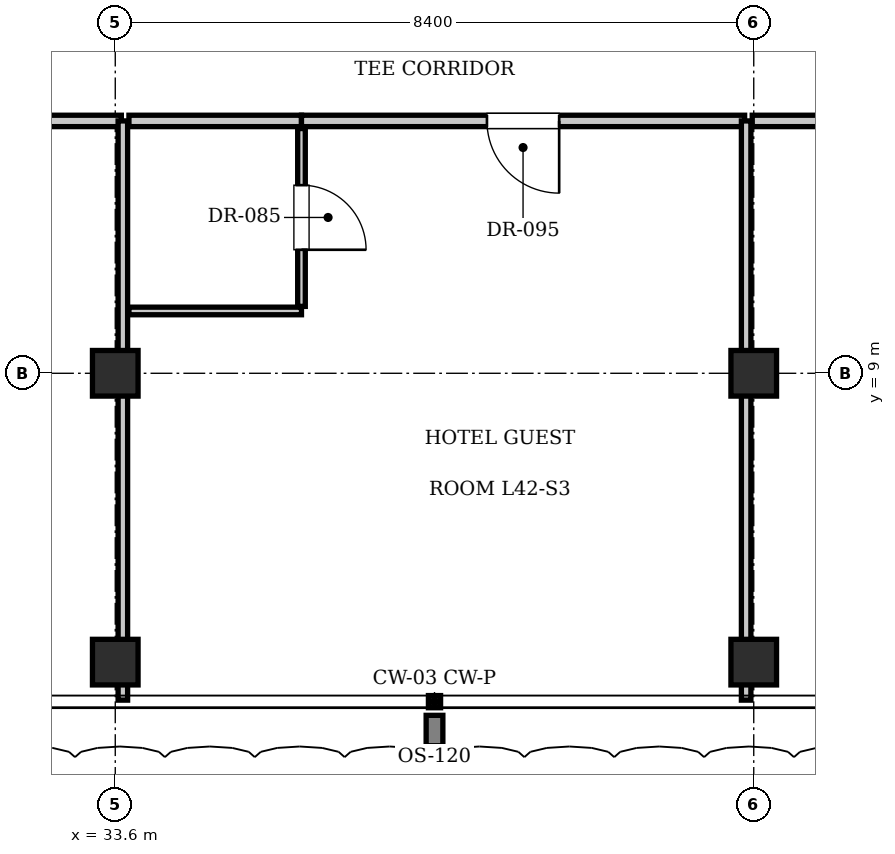
"""IFC4 building model, lengths in metres.
Left out: names, types, materials, properties, quantities, classifications, styles, units other than length and angle.
Written with IfcOpenShell. Run it as: python <this file> out.ifc"""

import sys

from ifc_helpers import new_model, si_unit, direction, frame, frame_2d, origin, origin_2d, place, context, subcontext, project, spatial, rectangle, i_section, extrude, element, fill, save


model = new_model("IFC4")
c1 = context("Model", 3, precision=1e-05, world=origin(), true_north=direction((0.0, 1.0)))
c2 = subcontext(c1, "Body", "Model", "MODEL_VIEW")
j1 = project(units=[si_unit("LENGTHUNIT", "METRE"), si_unit("PLANEANGLEUNIT", "RADIAN")], contexts=[c1])
p1 = place(None, origin())
s1 = spatial("IfcSite", under=j1, at=p1, CompositionType="ELEMENT")
p2 = place(p1, origin())
s2 = spatial("IfcBuilding", under=s1, at=p2, CompositionType="ELEMENT")
p3 = place(p2, frame((0.0, 0.0, 173.6)))
s3 = spatial("IfcBuildingStorey", under=s2, at=p3, CompositionType="ELEMENT", Elevation=173.6)
for number, where, z_axis, x_axis in (
    (1, (33.6, 9.0, 0.0), (0.0, 0.0, 1.0), (1.0, 0.0, 0.0)),
    (2, (42.0, 9.0, 0.0), (0.0, 0.0, 1.0), (1.0, 0.0, 0.0)),
    (3, (33.6, 5.2, 0.0), (0.0, 0.0, 1.0), (1.0, 0.0, 0.0)),
    (4, (42.0, 5.2, 0.0), (0.0, 0.0, 1.0), (1.0, 0.0, 0.0)),
):
    element("IfcColumn", number, at=place(p3, frame(where, z_axis=z_axis, x_axis=x_axis)), inside=s3, PredefinedType="COLUMN", context=c2, shape_type="SweptSolid", body=[
        extrude(i_section(OverallWidth=0.6, OverallDepth=0.6, WebThickness=0.025, FlangeThickness=0.038, at=origin_2d()), origin(), (0.0, 0.0, 1.0), 3.85),
    ])
p4 = place(p3, frame((27.95, 12.32, 0.0), z_axis=(0.0, 0.0, 1.0), x_axis=(1.0, 0.0, 0.0)))
e5 = element("IfcWall", 5, at=p4, inside=s3, PredefinedType="PARTITIONING", context=c2, shape_type="SweptSolid", body=[
    extrude(rectangle(XDim=5.73, YDim=0.15, at=frame_2d((2.865, 0.0))), origin(), (0.0, 0.0, 1.0), 3.61),
])
p5 = place(p4, frame((2.39, 0.0, 0.0)))
e6 = element("IfcOpeningElement", 6, at=p5, cuts=e5, PredefinedType="OPENING", context=c2, shape_type="SweptSolid", body=[
    extrude(rectangle(XDim=0.95, YDim=2.15, at=frame_2d((0.475, 1.075))), frame((0.0, 0.085, 0.0), z_axis=(0.0, -1.0, 0.0), x_axis=(1.0, 0.0, 0.0)), (0.0, 0.0, 1.0), 0.17),
])
p6 = place(p3, frame((33.7, 4.7, 0.0), z_axis=(0.0, 0.0, 1.0), x_axis=(0.0, 1.0, 0.0)))
e7 = element("IfcWall", 7, at=p6, inside=s3, PredefinedType="PARTITIONING", context=c2, shape_type="SweptSolid", body=[
    extrude(rectangle(XDim=7.62, YDim=0.125, at=frame_2d((3.81, 0.0))), origin(), (0.0, 0.0, 1.0), 3.007),
])
p7 = place(p3, frame((33.78, 12.32, 0.0), z_axis=(0.0, 0.0, 1.0), x_axis=(1.0, 0.0, 0.0)))
e8 = element("IfcWall", 8, at=p7, inside=s3, PredefinedType="PARTITIONING", context=c2, shape_type="SweptSolid", body=[
    extrude(rectangle(XDim=2.27, YDim=0.15, at=frame_2d((1.135, 0.0))), origin(), (0.0, 0.0, 1.0), 3.61),
])
p8 = place(p3, frame((33.78, 9.82, 0.0), z_axis=(0.0, 0.0, 1.0), x_axis=(1.0, 0.0, 0.0)))
e9 = element("IfcWall", 9, at=p8, inside=s3, PredefinedType="PARTITIONING", context=c2, shape_type="SweptSolid", body=[
    extrude(rectangle(XDim=2.27, YDim=0.1, at=frame_2d((1.135, 0.0))), origin(), (0.0, 0.0, 1.0), 3.61),
])
p9 = place(p3, frame((36.05, 9.88, 0.0), z_axis=(0.0, 0.0, 1.0), x_axis=(0.0, 1.0, 0.0)))
e10 = element("IfcWall", 10, at=p9, inside=s3, PredefinedType="PARTITIONING", context=c2, shape_type="SweptSolid", body=[
    extrude(rectangle(XDim=2.34, YDim=0.1, at=frame_2d((1.17, 0.0))), origin(), (0.0, 0.0, 1.0), 3.61),
])
p10 = place(p9, frame((0.745, 0.0, 0.0)))
e11 = element("IfcOpeningElement", 11, at=p10, cuts=e10, PredefinedType="OPENING", context=c2, shape_type="SweptSolid", body=[
    extrude(rectangle(XDim=0.85, YDim=2.1, at=frame_2d((0.425, 1.05))), frame((0.0, 0.06, 0.0), z_axis=(0.0, -1.0, 0.0), x_axis=(1.0, 0.0, 0.0)), (0.0, 0.0, 1.0), 0.12),
])
p11 = place(p3, frame((36.05, 12.32, 0.0), z_axis=(0.0, 0.0, 1.0), x_axis=(1.0, 0.0, 0.0)))
e12 = element("IfcWall", 12, at=p11, inside=s3, PredefinedType="PARTITIONING", context=c2, shape_type="SweptSolid", body=[
    extrude(rectangle(XDim=5.83, YDim=0.15, at=frame_2d((2.915, 0.0))), origin(), (0.0, 0.0, 1.0), 3.61),
])
p12 = place(p11, frame((2.44, 0.0, 0.0)))
e13 = element("IfcOpeningElement", 13, at=p12, cuts=e12, PredefinedType="OPENING", context=c2, shape_type="SweptSolid", body=[
    extrude(rectangle(XDim=0.95, YDim=2.15, at=frame_2d((0.475, 1.075))), frame((0.0, 0.085, 0.0), z_axis=(0.0, -1.0, 0.0), x_axis=(1.0, 0.0, 0.0)), (0.0, 0.0, 1.0), 0.17),
])
p13 = place(p3, frame((41.9, 4.7, 0.0), z_axis=(0.0, 0.0, 1.0), x_axis=(0.0, 1.0, 0.0)))
e14 = element("IfcWall", 14, at=p13, inside=s3, PredefinedType="PARTITIONING", context=c2, shape_type="SweptSolid", body=[
    extrude(rectangle(XDim=7.62, YDim=0.125, at=frame_2d((3.81, 0.0))), origin(), (0.0, 0.0, 1.0), 3.007),
])
p14 = place(p3, frame((41.98, 12.32, 0.0), z_axis=(0.0, 0.0, 1.0), x_axis=(1.0, 0.0, 0.0)))
e15 = element("IfcWall", 15, at=p14, inside=s3, PredefinedType="PARTITIONING", context=c2, shape_type="SweptSolid", body=[
    extrude(rectangle(XDim=5.67, YDim=0.15, at=frame_2d((2.835, 0.0))), origin(), (0.0, 0.0, 1.0), 3.61),
])
p15 = place(p14, frame((2.36, 0.0, 0.0)))
e16 = element("IfcOpeningElement", 16, at=p15, cuts=e15, PredefinedType="OPENING", context=c2, shape_type="SweptSolid", body=[
    extrude(rectangle(XDim=0.95, YDim=2.15, at=frame_2d((0.475, 1.075))), frame((0.0, 0.085, 0.0), z_axis=(0.0, -1.0, 0.0), x_axis=(1.0, 0.0, 0.0)), (0.0, 0.0, 1.0), 0.17),
])
p16 = place(p10, frame((0.85, 0.0, 0.0), z_axis=(0.0, 0.0, 1.0), x_axis=(-1.0, 0.0, 0.0)))
e17 = element("IfcDoor", 17, at=p16, inside=s3, OperationType="SINGLE_SWING_RIGHT", PredefinedType="DOOR", context=c2, shape_type="SweptSolid", body=[
    extrude(rectangle(XDim=0.85, YDim=2.1, at=frame_2d((0.425, 1.05))), frame((0.0, 0.025, 0.0), z_axis=(0.0, -1.0, 0.0), x_axis=(1.0, 0.0, 0.0)), (0.0, 0.0, 1.0), 0.05),
])
fill(e11, e17)
p17 = place(p12, frame((0.95, 0.0, 0.0), z_axis=(0.0, 0.0, 1.0), x_axis=(-1.0, 0.0, 0.0)))
e18 = element("IfcDoor", 18, at=p17, inside=s3, OperationType="SINGLE_SWING_LEFT", PredefinedType="DOOR", context=c2, shape_type="SweptSolid", body=[
    extrude(rectangle(XDim=0.95, YDim=2.15, at=frame_2d((0.475, 1.075))), frame((0.0, 0.025, 0.0), z_axis=(0.0, -1.0, 0.0), x_axis=(1.0, 0.0, 0.0)), (0.0, 0.0, 1.0), 0.05),
])
fill(e13, e18)
save(model, sys.argv[1])
